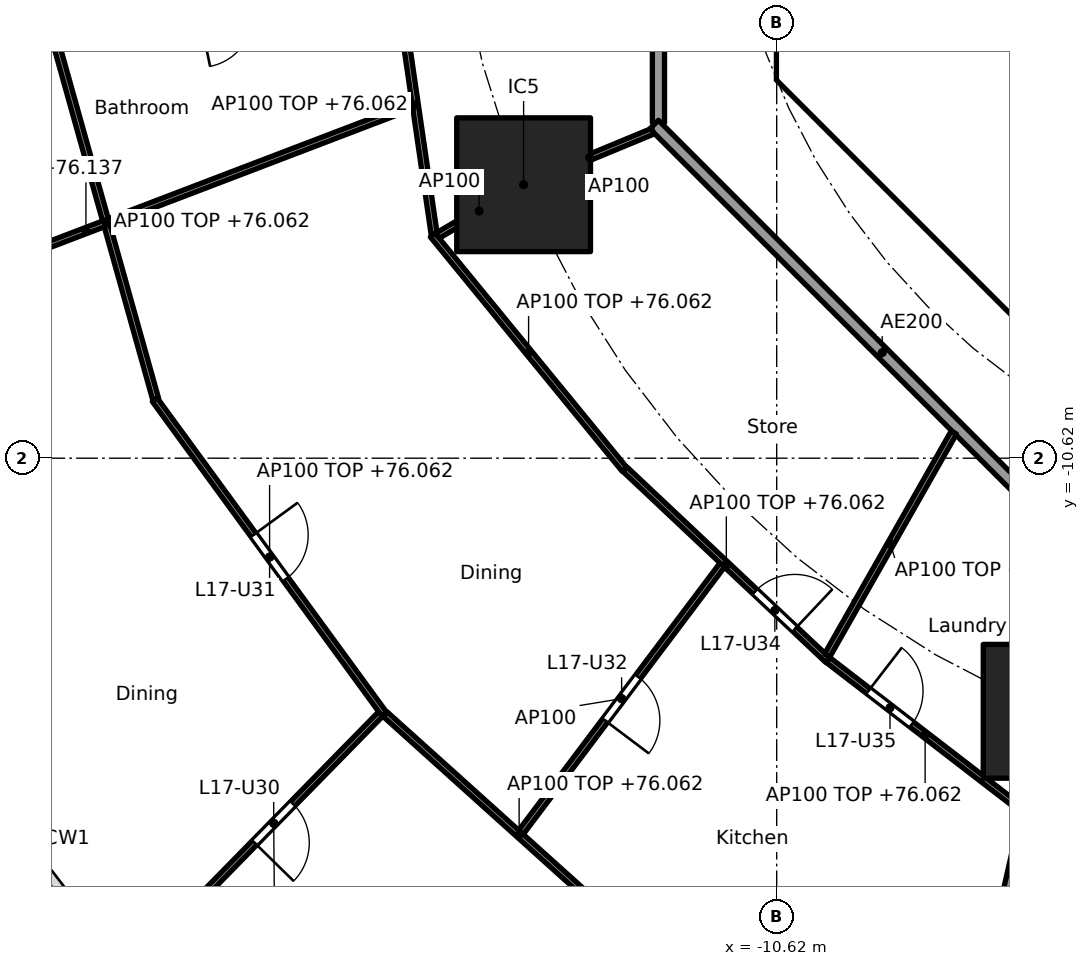
"""IFC4 building model, lengths in metres.
Left out: names, types, materials, properties, quantities, classifications, styles, units other than length and angle.
Written with IfcOpenShell. Run it as: python <this file> out.ifc"""

import sys

from ifc_helpers import new_model, si_unit, direction, frame, frame_2d, origin, origin_2d, place, context, subcontext, project, spatial, polyline, rectangle, outline, extrude, element, fill, save


model = new_model("IFC4")
c1 = context("Model", 3, precision=1e-05, world=origin(), true_north=direction((0.0, 1.0)))
c2 = subcontext(c1, "Body", "Model", "MODEL_VIEW")
j1 = project(units=[si_unit("LENGTHUNIT", "METRE"), si_unit("PLANEANGLEUNIT", "RADIAN")], contexts=[c1])
p1 = place(None, origin())
s1 = spatial("IfcSite", under=j1, at=p1, CompositionType="ELEMENT")
p2 = place(p1, origin())
s2 = spatial("IfcBuilding", under=s1, at=p2, CompositionType="ELEMENT")
p3 = place(p2, frame((0.0, 0.0, 73.3)))
s3 = spatial("IfcBuildingStorey", under=s2, at=p3, CompositionType="ELEMENT", Elevation=73.3)
for number, where, z_axis, x_axis in (
    (1, (-14.782, -6.123, 0.0), (0.0, 0.0, 1.0), (1.0, 0.0, 0.0)),
    (2, (-6.123, -14.782, 0.0), (0.0, 0.0, 1.0), (1.0, 0.0, 0.0)),
):
    element("IfcColumn", number, at=place(p3, frame(where, z_axis=z_axis, x_axis=x_axis)), inside=s3, PredefinedType="COLUMN", context=c2, shape_type="SweptSolid", body=[
        extrude(rectangle(XDim=2.2, YDim=2.2, at=origin_2d()), origin(), (0.0, 0.0, 1.0), 3.7),
    ])
p4 = place(p3, frame((-9.988, -4.613, 0.0), z_axis=(0.0, 0.0, 1.0), x_axis=(0.707106781187, -0.707106781187, 0.0)))
e3 = element("IfcWall", 3, at=p4, inside=s3, PredefinedType="SHEAR", context=c2, shape_type="SweptSolid", body=[
    extrude(rectangle(XDim=7.602, YDim=0.6, at=frame_2d((3.801, 0.0))), origin(), (0.0, 0.0, 1.0), 3.44),
])
p5 = place(p4, frame((6.151, 0.0, 0.0)))
e4 = element("IfcOpeningElement", 4, at=p5, cuts=e3, PredefinedType="OPENING", context=c2, shape_type="SweptSolid", body=[
    extrude(rectangle(XDim=1.1, YDim=2.1, at=frame_2d((0.55, 1.05))), frame((0.0, 0.31, 0.0), z_axis=(0.0, -1.0, 0.0), x_axis=(1.0, 0.0, 0.0)), (0.0, 0.0, 1.0), 0.62),
])
p6 = place(p3, frame((-7.0, -7.027, 0.0), z_axis=(0.0, 0.0, 1.0), x_axis=(0.0, 1.0, 0.0)))
e5 = element("IfcWall", 5, at=p6, inside=s3, PredefinedType="PARTITIONING", context=c2, shape_type="SweptSolid", body=[
    extrude(rectangle(XDim=2.927, YDim=0.15, at=frame_2d((1.463, 0.0))), origin(), (0.0, 0.0, 1.0), 3.44),
])
p7 = place(p6, frame((0.976, 0.0, 0.0)))
e6 = element("IfcOpeningElement", 6, at=p7, cuts=e5, PredefinedType="OPENING", context=c2, shape_type="SweptSolid", body=[
    extrude(rectangle(XDim=0.9, YDim=2.1, at=frame_2d((0.45, 1.05))), frame((0.0, 0.085, 0.0), z_axis=(0.0, -1.0, 0.0), x_axis=(1.0, 0.0, 0.0)), (0.0, 0.0, 1.0), 0.17),
])
p8 = place(p3, origin())
e7 = element("IfcWall", 7, at=p8, inside=s3, PredefinedType="SHEAR", context=c2, shape_type="SweptSolid", body=[
    extrude(outline(polyline([(-10.625, -3.801), (-10.025, -3.801), (-10.025, -4.152), (-9.776, -4.401), (-10.2, -4.825), (-10.625, -4.401), (-10.625, -3.801)])), origin(), (0.0, 0.0, 1.0), 3.44),
])
p9 = place(p3, frame((-10.025, -4.0, 0.0), z_axis=(0.0, 0.0, 1.0), x_axis=(1.0, 0.0, 0.0)))
e8 = element("IfcWall", 8, at=p9, inside=s3, PredefinedType="PARTITIONING", context=c2, shape_type="SweptSolid", body=[
    extrude(rectangle(XDim=3.325, YDim=0.2, at=frame_2d((1.662, 0.0))), origin(), (0.0, 0.0, 1.0), 3.44),
])
p10 = place(p3, frame((-6.134, -14.831, 0.0), z_axis=(0.0, 0.0, 1.0), x_axis=(-0.221225405869, -0.975222702667, 0.0)))
e9 = element("IfcWall", 9, at=p10, inside=s3, PredefinedType="PARTITIONING", context=c2, shape_type="SweptSolid", body=[
    extrude(rectangle(XDim=11.761, YDim=0.2, at=frame_2d((5.88, 0.0))), origin(), (0.0, 0.0, 1.0), 2.762),
])
p11 = place(p3, frame((-12.565, 5.304, 0.0), z_axis=(0.0, 0.0, 1.0), x_axis=(0.0, -1.0, 0.0)))
e10 = element("IfcWall", 10, at=p11, inside=s3, PredefinedType="PARTITIONING", context=c2, shape_type="SweptSolid", body=[
    extrude(rectangle(XDim=10.409, YDim=0.2, at=frame_2d((5.205, 0.0))), origin(), (0.0, 0.0, 1.0), 3.44),
])
p12 = place(p11, frame((4.804, 0.0, 0.0)))
e11 = element("IfcOpeningElement", 11, at=p12, cuts=e10, PredefinedType="OPENING", context=c2, shape_type="SweptSolid", body=[
    extrude(rectangle(XDim=1.0, YDim=2.1, at=frame_2d((0.5, 1.05))), frame((0.0, 0.11, 0.0), z_axis=(0.0, -1.0, 0.0), x_axis=(1.0, 0.0, 0.0)), (0.0, 0.0, 1.0), 0.22),
])
p13 = place(p3, frame((-12.635, -5.134, 0.0), z_axis=(0.0, 0.0, 1.0), x_axis=(0.707106781187, -0.707106781187, 0.0)))
e12 = element("IfcWall", 12, at=p13, inside=s3, PredefinedType="PARTITIONING", context=c2, shape_type="SweptSolid", body=[
    extrude(rectangle(XDim=10.609, YDim=0.2, at=frame_2d((5.305, 0.0))), origin(), (0.0, 0.0, 1.0), 3.44),
])
p14 = place(p3, frame((-16.874, -2.677, 0.0), z_axis=(0.0, 0.0, 1.0), x_axis=(0.144260658133, -0.989539722555, 0.0)))
e13 = element("IfcWall", 13, at=p14, inside=s3, PredefinedType="PARTITIONING", context=c2, shape_type="SweptSolid", body=[
    extrude(rectangle(XDim=4.309, YDim=0.1, at=frame_2d((2.154, 0.0))), origin(), (0.0, 0.0, 1.0), 2.762),
])
p15 = place(p3, frame((-22.463, -3.832, 0.0), z_axis=(0.0, 0.0, 1.0), x_axis=(0.269797759333, -0.962917010473, 0.0)))
e14 = element("IfcWall", 14, at=p15, inside=s3, PredefinedType="PARTITIONING", context=c2, shape_type="SweptSolid", body=[
    extrude(rectangle(XDim=6.043, YDim=0.1, at=frame_2d((3.021, 0.0))), origin(), (0.0, 0.0, 1.0), 2.762),
])
p16 = place(p3, frame((-16.61, -4.826, 0.0), z_axis=(0.0, 0.0, 1.0), x_axis=(-0.934174502909, -0.356816476798, 0.0)))
e15 = element("IfcWall", 15, at=p16, inside=s3, PredefinedType="PARTITIONING", context=c2, shape_type="SweptSolid", body=[
    extrude(rectangle(XDim=11.496, YDim=0.1, at=frame_2d((5.748, 0.0))), origin(), (0.0, 0.0, 1.0), 2.837),
])
p17 = place(p16, frame((7.993, 0.0, 0.0)))
e16 = element("IfcOpeningElement", 16, at=p17, cuts=e15, PredefinedType="OPENING", context=c2, shape_type="SweptSolid", body=[
    extrude(rectangle(XDim=0.9, YDim=2.1, at=frame_2d((0.45, 1.05))), frame((0.0, 0.06, 0.0), z_axis=(0.0, -1.0, 0.0), x_axis=(1.0, 0.0, 0.0)), (0.0, 0.0, 1.0), 0.12),
])
p18 = place(p3, frame((-12.657, -5.243, 0.0), z_axis=(0.0, 0.0, 1.0), x_axis=(-0.923864733477, -0.382719158442, 0.0)))
e17 = element("IfcWall", 17, at=p18, inside=s3, PredefinedType="PARTITIONING", context=c2, shape_type="SweptSolid", body=[
    extrude(rectangle(XDim=2.25, YDim=0.1, at=frame_2d((1.125, 0.0))), origin(), (0.0, 0.0, 1.0), 3.44),
])
p19 = place(p3, frame((-14.825, -6.148, 0.0), z_axis=(0.0, 0.0, 1.0), x_axis=(-0.860452514841, -0.509530636669, 0.0)))
e18 = element("IfcWall", 18, at=p19, inside=s3, PredefinedType="PARTITIONING", context=c2, shape_type="SweptSolid", body=[
    extrude(rectangle(XDim=1.601, YDim=0.1, at=frame_2d((0.8, 0.0))), origin(), (0.0, 0.0, 1.0), 3.44),
])
p20 = place(p3, frame((-16.277, -6.951, 0.0), z_axis=(0.0, 0.0, 1.0), x_axis=(0.633427340372, -0.773802173988, 0.0)))
e19 = element("IfcWall", 19, at=p20, inside=s3, PredefinedType="PARTITIONING", context=c2, shape_type="SweptSolid", body=[
    extrude(rectangle(XDim=4.979, YDim=0.1, at=frame_2d((2.49, 0.0))), origin(), (0.0, 0.0, 1.0), 2.762),
])
p21 = place(p3, frame((-20.848, -9.658, 0.0), z_axis=(0.0, 0.0, 1.0), x_axis=(0.5895799361, -0.807710033953, 0.0)))
e20 = element("IfcWall", 20, at=p21, inside=s3, PredefinedType="PARTITIONING", context=c2, shape_type="SweptSolid", body=[
    extrude(rectangle(XDim=6.408, YDim=0.1, at=frame_2d((3.204, 0.0))), origin(), (0.0, 0.0, 1.0), 2.762),
])
p22 = place(p21, frame((2.754, 0.0, 0.0)))
e21 = element("IfcOpeningElement", 21, at=p22, cuts=e20, PredefinedType="OPENING", context=c2, shape_type="SweptSolid", body=[
    extrude(rectangle(XDim=0.9, YDim=2.1, at=frame_2d((0.45, 1.05))), frame((0.0, 0.06, 0.0), z_axis=(0.0, -1.0, 0.0), x_axis=(1.0, 0.0, 0.0)), (0.0, 0.0, 1.0), 0.12),
])
p23 = place(p3, frame((-13.118, -10.8, 0.0), z_axis=(0.0, 0.0, 1.0), x_axis=(0.72818280142, -0.685382964273, 0.0)))
e22 = element("IfcWall", 22, at=p23, inside=s3, PredefinedType="PARTITIONING", context=c2, shape_type="SweptSolid", body=[
    extrude(rectangle(XDim=4.586, YDim=0.1, at=frame_2d((2.293, 0.0))), origin(), (0.0, 0.0, 1.0), 2.762),
])
p24 = place(p23, frame((2.94, 0.0, 0.0)))
e23 = element("IfcOpeningElement", 23, at=p24, cuts=e22, PredefinedType="OPENING", context=c2, shape_type="SweptSolid", body=[
    extrude(rectangle(XDim=0.9, YDim=2.1, at=frame_2d((0.45, 1.05))), frame((0.0, 0.06, 0.0), z_axis=(0.0, -1.0, 0.0), x_axis=(1.0, 0.0, 0.0)), (0.0, 0.0, 1.0), 0.12),
])
p25 = place(p3, frame((-17.135, -14.829, 0.0), z_axis=(0.0, 0.0, 1.0), x_axis=(-0.699702869429, -0.714433967917, 0.0)))
e24 = element("IfcWall", 24, at=p25, inside=s3, PredefinedType="PARTITIONING", context=c2, shape_type="SweptSolid", body=[
    extrude(rectangle(XDim=5.022, YDim=0.1, at=frame_2d((2.511, 0.0))), origin(), (0.0, 0.0, 1.0), 2.762),
])
p26 = place(p25, frame((2.061, 0.0, 0.0)))
e25 = element("IfcOpeningElement", 25, at=p26, cuts=e24, PredefinedType="OPENING", context=c2, shape_type="SweptSolid", body=[
    extrude(rectangle(XDim=0.9, YDim=2.1, at=frame_2d((0.45, 1.05))), frame((0.0, 0.06, 0.0), z_axis=(0.0, -1.0, 0.0), x_axis=(1.0, 0.0, 0.0)), (0.0, 0.0, 1.0), 0.12),
])
p27 = place(p3, frame((-17.063, -14.827, 0.0), z_axis=(0.0, 0.0, 1.0), x_axis=(0.743478142868, -0.668760234373, 0.0)))
e26 = element("IfcWall", 26, at=p27, inside=s3, PredefinedType="PARTITIONING", context=c2, shape_type="SweptSolid", body=[
    extrude(rectangle(XDim=5.937, YDim=0.1, at=frame_2d((2.969, 0.0))), origin(), (0.0, 0.0, 1.0), 2.762),
])
p28 = place(p3, frame((-11.515, -12.377, 0.0), z_axis=(0.0, 0.0, 1.0), x_axis=(-0.60163860397, -0.798768420891, 0.0)))
e27 = element("IfcWall", 27, at=p28, inside=s3, PredefinedType="PARTITIONING", context=c2, shape_type="SweptSolid", body=[
    extrude(rectangle(XDim=5.502, YDim=0.1, at=frame_2d((2.751, 0.0))), origin(), (0.0, 0.0, 1.0), 3.44),
])
p29 = place(p28, frame((2.301, 0.0, 0.0)))
e28 = element("IfcOpeningElement", 28, at=p29, cuts=e27, PredefinedType="OPENING", context=c2, shape_type="SweptSolid", body=[
    extrude(rectangle(XDim=0.9, YDim=2.1, at=frame_2d((0.45, 1.05))), frame((0.0, 0.06, 0.0), z_axis=(0.0, -1.0, 0.0), x_axis=(1.0, 0.0, 0.0)), (0.0, 0.0, 1.0), 0.12),
])
p30 = place(p3, frame((-7.707, -10.198, 0.0), z_axis=(0.0, 0.0, 1.0), x_axis=(-0.493986531217, -0.869469554945, 0.0)))
e29 = element("IfcWall", 29, at=p30, inside=s3, PredefinedType="PARTITIONING", context=c2, shape_type="SweptSolid", body=[
    extrude(rectangle(XDim=4.217, YDim=0.1, at=frame_2d((2.109, 0.0))), origin(), (0.0, 0.0, 1.0), 2.687),
])
p31 = place(p3, frame((-9.775, -13.939, 0.0), z_axis=(0.0, 0.0, 1.0), x_axis=(0.792162117554, -0.610310723741, 0.0)))
e30 = element("IfcWall", 30, at=p31, inside=s3, PredefinedType="PARTITIONING", context=c2, shape_type="SweptSolid", body=[
    extrude(rectangle(XDim=4.03, YDim=0.1, at=frame_2d((2.015, 0.0))), origin(), (0.0, 0.0, 1.0), 2.762),
])
p32 = place(p31, frame((0.836, 0.0, 0.0)))
e31 = element("IfcOpeningElement", 31, at=p32, cuts=e30, PredefinedType="OPENING", context=c2, shape_type="SweptSolid", body=[
    extrude(rectangle(XDim=0.9, YDim=2.1, at=frame_2d((0.45, 1.05))), frame((0.0, 0.06, 0.0), z_axis=(0.0, -1.0, 0.0), x_axis=(1.0, 0.0, 0.0)), (0.0, 0.0, 1.0), 0.12),
])
p33 = place(p7, origin())
e32 = element("IfcDoor", 32, at=p33, inside=s3, OperationType="SINGLE_SWING_RIGHT", PredefinedType="DOOR", context=c2, shape_type="SweptSolid", body=[
    extrude(rectangle(XDim=0.9, YDim=2.1, at=frame_2d((0.45, 1.05))), frame((0.0, 0.025, 0.0), z_axis=(0.0, -1.0, 0.0), x_axis=(1.0, 0.0, 0.0)), (0.0, 0.0, 1.0), 0.05),
])
fill(e6, e32)
p34 = place(p26, origin())
e33 = element("IfcDoor", 33, at=p34, inside=s3, OperationType="SINGLE_SWING_RIGHT", PredefinedType="DOOR", context=c2, shape_type="SweptSolid", body=[
    extrude(rectangle(XDim=0.9, YDim=2.1, at=frame_2d((0.45, 1.05))), frame((0.0, 0.025, 0.0), z_axis=(0.0, -1.0, 0.0), x_axis=(1.0, 0.0, 0.0)), (0.0, 0.0, 1.0), 0.05),
])
fill(e25, e33)
p35 = place(p22, origin())
e34 = element("IfcDoor", 34, at=p35, inside=s3, OperationType="SINGLE_SWING_LEFT", PredefinedType="DOOR", context=c2, shape_type="SweptSolid", body=[
    extrude(rectangle(XDim=0.9, YDim=2.1, at=frame_2d((0.45, 1.05))), frame((0.0, 0.025, 0.0), z_axis=(0.0, -1.0, 0.0), x_axis=(1.0, 0.0, 0.0)), (0.0, 0.0, 1.0), 0.05),
])
fill(e21, e34)
p36 = place(p29, origin())
e35 = element("IfcDoor", 35, at=p36, inside=s3, OperationType="SINGLE_SWING_RIGHT", PredefinedType="DOOR", context=c2, shape_type="SweptSolid", body=[
    extrude(rectangle(XDim=0.9, YDim=2.1, at=frame_2d((0.45, 1.05))), frame((0.0, 0.025, 0.0), z_axis=(0.0, -1.0, 0.0), x_axis=(1.0, 0.0, 0.0)), (0.0, 0.0, 1.0), 0.05),
])
fill(e28, e35)
p37 = place(p24, origin())
e36 = element("IfcDoor", 36, at=p37, inside=s3, OperationType="SINGLE_SWING_RIGHT", PredefinedType="DOOR", context=c2, shape_type="SweptSolid", body=[
    extrude(rectangle(XDim=0.9, YDim=2.1, at=frame_2d((0.45, 1.05))), frame((0.0, 0.025, 0.0), z_axis=(0.0, -1.0, 0.0), x_axis=(1.0, 0.0, 0.0)), (0.0, 0.0, 1.0), 0.05),
])
fill(e23, e36)
p38 = place(p32, origin())
e37 = element("IfcDoor", 37, at=p38, inside=s3, OperationType="SINGLE_SWING_LEFT", PredefinedType="DOOR", context=c2, shape_type="SweptSolid", body=[
    extrude(rectangle(XDim=0.9, YDim=2.1, at=frame_2d((0.45, 1.05))), frame((0.0, 0.025, 0.0), z_axis=(0.0, -1.0, 0.0), x_axis=(1.0, 0.0, 0.0)), (0.0, 0.0, 1.0), 0.05),
])
fill(e31, e37)
save(model, sys.argv[1])
